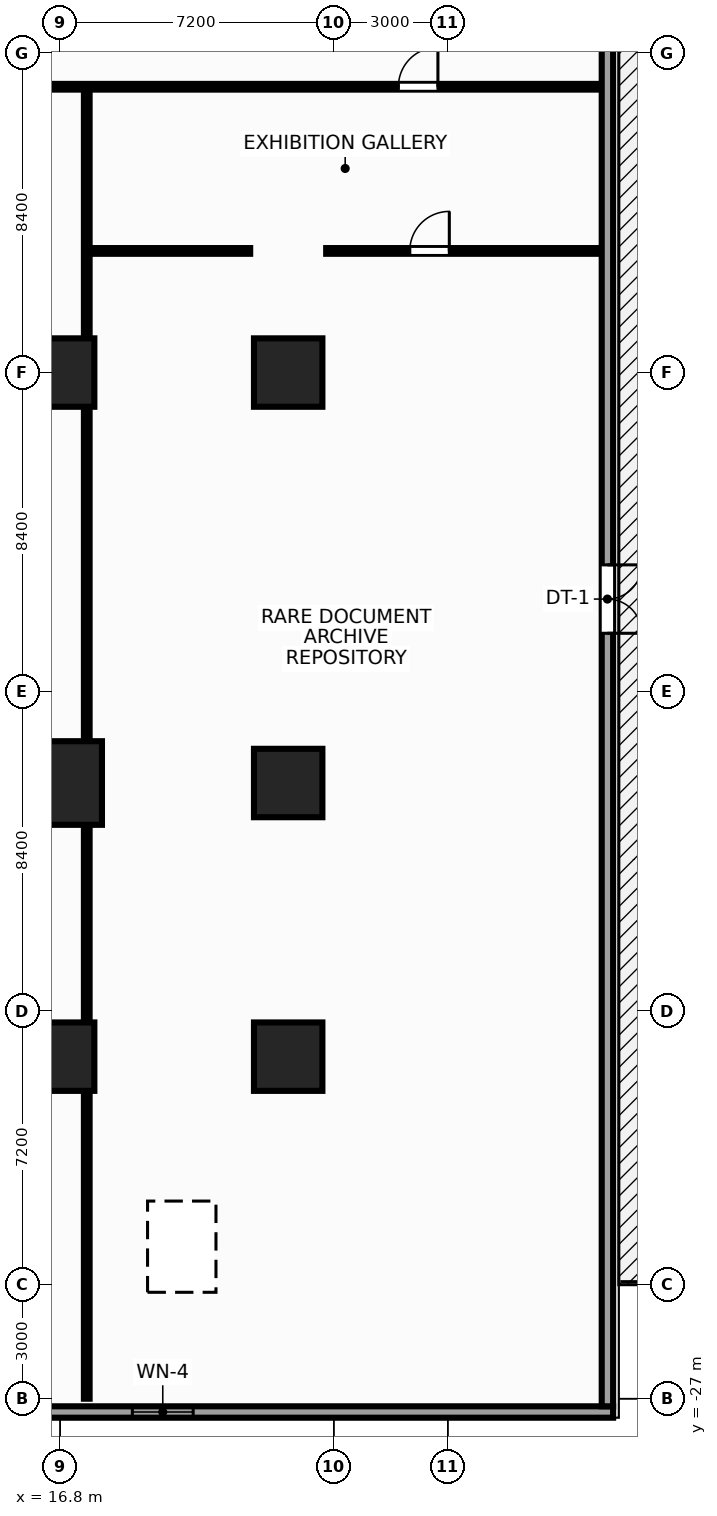
"""IFC4 building model, lengths in metres.
Left out: names, types, materials, properties, quantities, classifications, styles, units other than length and angle.
Written with IfcOpenShell. Run it as: python <this file> out.ifc"""

import sys

from ifc_helpers import new_model, si_unit, direction, frame, frame_2d, origin, origin_2d, place, context, subcontext, project, spatial, rectangle, extrude, source, transform, mapped, element, fill, save


model = new_model("IFC4")
c1 = context("Model", 3, precision=1e-05, world=origin(), true_north=direction((0.0, 1.0)))
c2 = subcontext(c1, "Body", "Model", "MODEL_VIEW")
j1 = project(units=[si_unit("LENGTHUNIT", "METRE"), si_unit("PLANEANGLEUNIT", "RADIAN")], contexts=[c1])
p1 = place(None, origin())
s1 = spatial("IfcSite", under=j1, at=p1, CompositionType="ELEMENT")
p2 = place(p1, origin())
s2 = spatial("IfcBuilding", under=s1, at=p2, CompositionType="ELEMENT")
p3 = place(p2, frame((0.0, 0.0, 14.3)))
s3 = spatial("IfcBuildingStorey", under=s2, at=p3, CompositionType="ELEMENT", Elevation=14.3)
m1 = source(origin(), c2, "Body", "SweptSolid", [
    extrude(rectangle(XDim=1.8, YDim=1.8, at=origin_2d()), origin(), (0.0, 0.0, 1.0), 4.65),
])
p4 = place(p3, frame((16.8, -18.0, 0.0), z_axis=(0.0, 0.0, 1.0), x_axis=(1.0, 0.0, 0.0)))
e1 = element("IfcColumn", 1, at=p4, inside=s3, PredefinedType="COLUMN", context=c2, shape_type="MappedRepresentation", body=[
    mapped(m1, transform((0.0, 0.0, 0.0), x_axis=(1.0, 0.0, 0.0), y_axis=(0.0, 1.0, 0.0), z_axis=(0.0, 0.0, 1.0), scale=1.0)),
])
m2 = source(origin(), c2, "Body", "SweptSolid", [
    extrude(rectangle(XDim=2.2, YDim=2.2, at=origin_2d()), origin(), (0.0, 0.0, 1.0), 4.65),
])
p5 = place(p3, frame((16.8, -10.8, 0.0), z_axis=(0.0, 0.0, 1.0), x_axis=(1.0, 0.0, 0.0)))
e2 = element("IfcColumn", 2, at=p5, inside=s3, PredefinedType="COLUMN", context=c2, shape_type="MappedRepresentation", body=[
    mapped(m2, transform((0.0, 0.0, 0.0), x_axis=(1.0, 0.0, 0.0), y_axis=(0.0, 1.0, 0.0), z_axis=(0.0, 0.0, 1.0), scale=1.0)),
])
for number, where, z_axis, x_axis in (
    (3, (16.8, 0.0, 0.0), (0.0, 0.0, 1.0), (1.0, 0.0, 0.0)),
    (4, (22.8, -18.0, 0.0), (0.0, 0.0, 1.0), (1.0, 0.0, 0.0)),
    (5, (22.8, -10.8, 0.0), (0.0, 0.0, 1.0), (1.0, 0.0, 0.0)),
    (6, (22.8, 0.0, 0.0), (0.0, 0.0, 1.0), (1.0, 0.0, 0.0)),
):
    element("IfcColumn", number, at=place(p3, frame(where, z_axis=z_axis, x_axis=x_axis)), inside=s3, PredefinedType="COLUMN", context=c2, shape_type="MappedRepresentation", body=[
        mapped(m1, transform((0.0, 0.0, 0.0), x_axis=(1.0, 0.0, 0.0), y_axis=(0.0, 1.0, 0.0), z_axis=(0.0, 0.0, 1.0), scale=1.0)),
    ])
m3 = source(origin(), c2, "Body", "SweptSolid", [
    extrude(rectangle(XDim=62.7, YDim=0.3, at=frame_2d((31.35, 0.0))), origin(), (0.0, 0.0, 1.0), 3.83),
])
p6 = place(p3, frame((31.35, -27.35, 0.0), z_axis=(0.0, 0.0, 1.0), x_axis=(-1.0, 0.0, 0.0)))
e7 = element("IfcWall", 7, at=p6, inside=s3, PredefinedType="STANDARD", context=c2, shape_type="MappedRepresentation", body=[
    mapped(m3, transform((0.0, 0.0, 0.0), x_axis=(1.0, 0.0, 0.0), y_axis=(0.0, 1.0, 0.0), z_axis=(0.0, 0.0, 1.0), scale=1.0)),
])
p7 = place(p6, frame((11.05, 0.0, 0.9)))
e8 = element("IfcOpeningElement", 8, at=p7, cuts=e7, PredefinedType="OPENING", context=c2, shape_type="SweptSolid", body=[
    extrude(rectangle(XDim=1.6, YDim=2.1, at=frame_2d((0.8, 1.05))), frame((0.0, 0.162, 0.0), z_axis=(0.0, -1.0, 0.0), x_axis=(1.0, 0.0, 0.0)), (0.0, 0.0, 1.0), 0.324),
])
p8 = place(p6, frame((17.55, 0.0, 0.9)))
e9 = element("IfcOpeningElement", 9, at=p8, cuts=e7, PredefinedType="OPENING", context=c2, shape_type="SweptSolid", body=[
    extrude(rectangle(XDim=1.6, YDim=2.1, at=frame_2d((0.8, 1.05))), frame((0.0, 0.162, 0.0), z_axis=(0.0, -1.0, 0.0), x_axis=(1.0, 0.0, 0.0)), (0.0, 0.0, 1.0), 0.324),
])
p9 = place(p6, frame((43.55, 0.0, 0.9)))
e10 = element("IfcOpeningElement", 10, at=p9, cuts=e7, PredefinedType="OPENING", context=c2, shape_type="SweptSolid", body=[
    extrude(rectangle(XDim=1.6, YDim=2.1, at=frame_2d((0.8, 1.05))), frame((0.0, 0.162, 0.0), z_axis=(0.0, -1.0, 0.0), x_axis=(1.0, 0.0, 0.0)), (0.0, 0.0, 1.0), 0.324),
])
p10 = place(p6, frame((50.05, 0.0, 0.9)))
e11 = element("IfcOpeningElement", 11, at=p10, cuts=e7, PredefinedType="OPENING", context=c2, shape_type="SweptSolid", body=[
    extrude(rectangle(XDim=1.6, YDim=2.1, at=frame_2d((0.8, 1.05))), frame((0.0, 0.162, 0.0), z_axis=(0.0, -1.0, 0.0), x_axis=(1.0, 0.0, 0.0)), (0.0, 0.0, 1.0), 0.324),
])
m4 = source(origin(), c2, "Body", "SweptSolid", [
    extrude(rectangle(XDim=52.79, YDim=0.3, at=frame_2d((26.395, 0.0))), origin(), (0.0, 0.0, 1.0), 3.83),
])
p11 = place(p3, frame((31.2, 25.59, 0.0), z_axis=(0.0, 0.0, 1.0), x_axis=(0.0, -1.0, 0.0)))
e12 = element("IfcWall", 12, at=p11, inside=s3, PredefinedType="STANDARD", context=c2, shape_type="MappedRepresentation", body=[
    mapped(m4, transform((0.0, 0.0, 0.0), x_axis=(1.0, 0.0, 0.0), y_axis=(0.0, 1.0, 0.0), z_axis=(0.0, 0.0, 1.0), scale=1.0)),
])
p12 = place(p11, frame((30.65, 0.0, 0.0)))
e13 = element("IfcOpeningElement", 13, at=p12, cuts=e12, PredefinedType="OPENING", context=c2, shape_type="SweptSolid", body=[
    extrude(rectangle(XDim=1.8, YDim=2.2, at=frame_2d((0.9, 1.1))), frame((0.0, 0.162, 0.0), z_axis=(0.0, -1.0, 0.0), x_axis=(1.0, 0.0, 0.0)), (0.0, 0.0, 1.0), 0.324),
])
m5 = source(origin(), c2, "Body", "SweptSolid", [
    extrude(rectangle(XDim=62.0, YDim=0.15, at=frame_2d((31.0, 0.0))), origin(), (0.0, 0.0, 1.0), 3.715),
])
p13 = place(p3, frame((-31.0, 7.52, 0.0), z_axis=(0.0, 0.0, 1.0), x_axis=(1.0, 0.0, 0.0)))
e14 = element("IfcWall", 14, at=p13, inside=s3, PredefinedType="PARTITIONING", context=c2, shape_type="MappedRepresentation", body=[
    mapped(m5, transform((0.0, 0.0, 0.0), x_axis=(1.0, 0.0, 0.0), y_axis=(0.0, 1.0, 0.0), z_axis=(0.0, 0.0, 1.0), scale=1.0)),
])
p14 = place(p13, frame((4.2, 0.0, 0.0)))
e15 = element("IfcOpeningElement", 15, at=p14, cuts=e14, PredefinedType="OPENING", context=c2, shape_type="SweptSolid", body=[
    extrude(rectangle(XDim=1.04, YDim=2.2, at=frame_2d((0.52, 1.1))), frame((0.0, 0.087, 0.0), z_axis=(0.0, -1.0, 0.0), x_axis=(1.0, 0.0, 0.0)), (0.0, 0.0, 1.0), 0.174),
])
p15 = place(p13, frame((30.2, 0.0, 0.0)))
e16 = element("IfcOpeningElement", 16, at=p15, cuts=e14, PredefinedType="OPENING", context=c2, shape_type="SweptSolid", body=[
    extrude(rectangle(XDim=1.65, YDim=2.35, at=frame_2d((0.825, 1.175))), frame((0.0, 0.087, 0.0), z_axis=(0.0, -1.0, 0.0), x_axis=(1.0, 0.0, 0.0)), (0.0, 0.0, 1.0), 0.174),
])
p16 = place(p13, frame((56.7, 0.0, 0.0)))
e17 = element("IfcOpeningElement", 17, at=p16, cuts=e14, PredefinedType="OPENING", context=c2, shape_type="SweptSolid", body=[
    extrude(rectangle(XDim=1.04, YDim=2.2, at=frame_2d((0.52, 1.1))), frame((0.0, 0.087, 0.0), z_axis=(0.0, -1.0, 0.0), x_axis=(1.0, 0.0, 0.0)), (0.0, 0.0, 1.0), 0.174),
])
m6 = source(origin(), c2, "Body", "SweptSolid", [
    extrude(rectangle(XDim=34.38, YDim=0.15, at=frame_2d((17.19, 0.0))), origin(), (0.0, 0.0, 1.0), 3.715),
])
p17 = place(p3, frame((17.5, -27.0, 0.0), z_axis=(0.0, 0.0, 1.0), x_axis=(0.0, 1.0, 0.0)))
e18 = element("IfcWall", 18, at=p17, inside=s3, PredefinedType="PARTITIONING", context=c2, shape_type="MappedRepresentation", body=[
    mapped(m6, transform((0.0, 0.0, 0.0), x_axis=(1.0, 0.0, 0.0), y_axis=(0.0, 1.0, 0.0), z_axis=(0.0, 0.0, 1.0), scale=1.0)),
])
m7 = source(origin(), c2, "Body", "SweptSolid", [
    extrude(rectangle(XDim=4.18, YDim=0.15, at=frame_2d((2.09, 0.0))), origin(), (0.0, 0.0, 1.0), 4.33),
])
p18 = place(p3, frame((17.62, 3.2, 0.0), z_axis=(0.0, 0.0, 1.0), x_axis=(1.0, 0.0, 0.0)))
e19 = element("IfcWall", 19, at=p18, inside=s3, PredefinedType="PARTITIONING", context=c2, shape_type="MappedRepresentation", body=[
    mapped(m7, transform((0.0, 0.0, 0.0), x_axis=(1.0, 0.0, 0.0), y_axis=(0.0, 1.0, 0.0), z_axis=(0.0, 0.0, 1.0), scale=1.0)),
])
m8 = source(origin(), c2, "Body", "SweptSolid", [
    extrude(rectangle(XDim=7.2, YDim=0.15, at=frame_2d((3.6, 0.0))), origin(), (0.0, 0.0, 1.0), 4.33),
])
p19 = place(p3, frame((23.8, 3.2, 0.0), z_axis=(0.0, 0.0, 1.0), x_axis=(1.0, 0.0, 0.0)))
e20 = element("IfcWall", 20, at=p19, inside=s3, PredefinedType="PARTITIONING", context=c2, shape_type="MappedRepresentation", body=[
    mapped(m8, transform((0.0, 0.0, 0.0), x_axis=(1.0, 0.0, 0.0), y_axis=(0.0, 1.0, 0.0), z_axis=(0.0, 0.0, 1.0), scale=1.0)),
])
p20 = place(p19, frame((2.2, 0.0, 0.0)))
e21 = element("IfcOpeningElement", 21, at=p20, cuts=e20, PredefinedType="OPENING", context=c2, shape_type="SweptSolid", body=[
    extrude(rectangle(XDim=1.04, YDim=2.2, at=frame_2d((0.52, 1.1))), frame((0.0, 0.087, 0.0), z_axis=(0.0, -1.0, 0.0), x_axis=(1.0, 0.0, 0.0)), (0.0, 0.0, 1.0), 0.174),
])
m9 = source(origin(), c2, "Body", "SweptSolid", [
    extrude(rectangle(XDim=1.6, YDim=2.1, at=frame_2d((0.8, 1.05))), frame((0.0, 0.03, 0.0), z_axis=(0.0, -1.0, 0.0), x_axis=(1.0, 0.0, 0.0)), (0.0, 0.0, 1.0), 0.06),
])
p21 = place(p7, origin())
e22 = element("IfcWindow", 22, at=p21, inside=s3, PartitioningType="SINGLE_PANEL", PredefinedType="WINDOW", context=c2, shape_type="MappedRepresentation", body=[
    mapped(m9, transform((0.0, 0.0, 0.0), x_axis=(1.0, 0.0, 0.0), y_axis=(0.0, 1.0, 0.0), z_axis=(0.0, 0.0, 1.0), scale=1.0)),
])
fill(e8, e22)
m10 = source(origin(), c2, "Body", "SweptSolid", [
    extrude(rectangle(XDim=1.8, YDim=2.2, at=frame_2d((0.9, 1.1))), frame((0.0, 0.025, 0.0), z_axis=(0.0, -1.0, 0.0), x_axis=(1.0, 0.0, 0.0)), (0.0, 0.0, 1.0), 0.05),
])
p22 = place(p12, origin())
e23 = element("IfcDoor", 23, at=p22, inside=s3, OperationType="DOUBLE_DOOR_SINGLE_SWING", PredefinedType="DOOR", context=c2, shape_type="MappedRepresentation", body=[
    mapped(m10, transform((0.0, 0.0, 0.0), x_axis=(1.0, 0.0, 0.0), y_axis=(0.0, 1.0, 0.0), z_axis=(0.0, 0.0, 1.0), scale=1.0)),
])
fill(e13, e23)
p23 = place(p3, frame((0.0, 0.0, -0.28)))
p24 = place(p23, frame((20.0, -23.0, -0.012)))
p25 = place(p24, frame((0.0, 0.0, 0.242)))
e24 = element("IfcWindow", 24, at=p25, inside=s3, PartitioningType="SINGLE_PANEL", PredefinedType="SKYLIGHT", context=c2, shape_type="SweptSolid", body=[
    extrude(rectangle(XDim=1.8, YDim=2.4, at=origin_2d()), origin(), (0.0, 0.0, 1.0), 0.05),
])
m11 = source(origin(), c2, "Body", "SweptSolid", [
    extrude(rectangle(XDim=1.04, YDim=2.2, at=frame_2d((0.52, 1.1))), frame((0.0, 0.025, 0.0), z_axis=(0.0, -1.0, 0.0), x_axis=(1.0, 0.0, 0.0)), (0.0, 0.0, 1.0), 0.05),
])
p26 = place(p16, origin())
e25 = element("IfcDoor", 25, at=p26, inside=s3, OperationType="SINGLE_SWING_RIGHT", PredefinedType="DOOR", context=c2, shape_type="MappedRepresentation", body=[
    mapped(m11, transform((0.0, 0.0, 0.0), x_axis=(1.0, 0.0, 0.0), y_axis=(0.0, 1.0, 0.0), z_axis=(0.0, 0.0, 1.0), scale=1.0)),
])
fill(e17, e25)
p27 = place(p20, origin())
e26 = element("IfcDoor", 26, at=p27, inside=s3, OperationType="SINGLE_SWING_RIGHT", PredefinedType="DOOR", context=c2, shape_type="MappedRepresentation", body=[
    mapped(m11, transform((0.0, 0.0, 0.0), x_axis=(1.0, 0.0, 0.0), y_axis=(0.0, 1.0, 0.0), z_axis=(0.0, 0.0, 1.0), scale=1.0)),
])
fill(e21, e26)
save(model, sys.argv[1])
